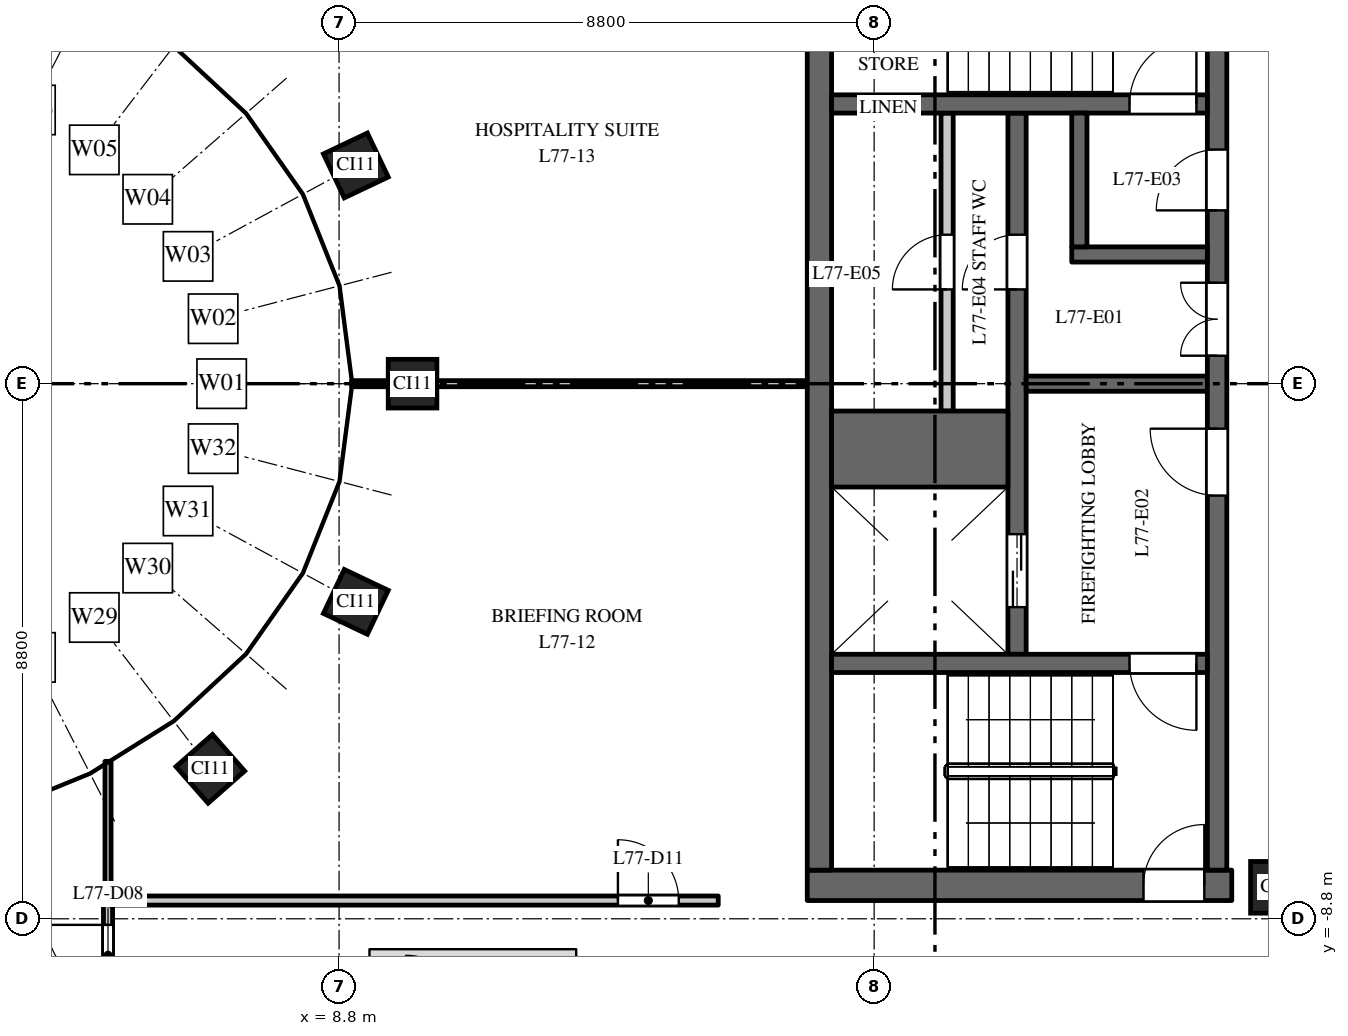
"""IFC4 building model, lengths in metres.
Left out: names, types, materials, properties, quantities, classifications, styles, units other than length and angle.
Written with IfcOpenShell. Run it as: python <this file> out.ifc"""

import sys

from ifc_helpers import new_model, si_unit, direction, frame, frame_2d, origin, origin_2d, place, context, subcontext, project, spatial, rectangle, extrude, element, fill, save


model = new_model("IFC4")
c1 = context("Model", 3, precision=1e-05, world=origin(), true_north=direction((0.0, 1.0)))
c2 = subcontext(c1, "Body", "Model", "MODEL_VIEW")
j1 = project(units=[si_unit("LENGTHUNIT", "METRE"), si_unit("PLANEANGLEUNIT", "RADIAN")], contexts=[c1])
p1 = place(None, origin())
s1 = spatial("IfcSite", under=j1, at=p1, CompositionType="ELEMENT")
p2 = place(p1, origin())
s2 = spatial("IfcBuilding", under=s1, at=p2, CompositionType="ELEMENT")
p3 = place(p2, frame((0.0, 0.0, 351.0)))
s3 = spatial("IfcBuildingStorey", under=s2, at=p3, CompositionType="ELEMENT", Elevation=351.0)
p4 = place(p3, frame((26.922, 0.0, 0.024), z_axis=(-0.671748348073, 0.0, 0.740779425242), x_axis=(0.0, -1.0, 0.0)))
e1 = element("IfcColumn", 1, at=p4, inside=s3, PredefinedType="COLUMN", context=c2, shape_type="SweptSolid", body=[
    extrude(rectangle(XDim=0.85, YDim=0.85, at=origin_2d()), origin(), (0.0, 0.0, 1.0), 7.392),
])
p5 = place(p3, frame((26.605, 2.884, 0.024), z_axis=(-0.663002424258, -0.107229988497, 0.740897776346), x_axis=(0.159659238674, -0.987172187365, 0.0)))
e2 = element("IfcColumn", 2, at=p5, inside=s3, PredefinedType="COLUMN", context=c2, shape_type="SweptSolid", body=[
    extrude(rectangle(XDim=0.85, YDim=0.85, at=origin_2d()), origin(), (0.0, 0.0, 1.0), 7.39),
])
p6 = place(p3, frame((25.682, 5.672, 0.058), z_axis=(-0.281200724754, -0.092390850742, 0.955191123858), x_axis=(0.312142088562, -0.950035429102, 0.0)))
e3 = element("IfcColumn", 3, at=p6, inside=s3, PredefinedType="COLUMN", context=c2, shape_type="SweptSolid", body=[
    extrude(rectangle(XDim=0.85, YDim=0.85, at=origin_2d()), origin(), (0.0, 0.0, 1.0), 5.697),
])
p7 = place(p3, frame((19.92, -12.714, 0.024), z_axis=(-0.48918887633, 0.459337710272, 0.7414196593), x_axis=(-0.684514461897, -0.728999280832, 0.0)))
e4 = element("IfcColumn", 4, at=p7, inside=s3, PredefinedType="COLUMN", context=c2, shape_type="SweptSolid", body=[
    extrude(rectangle(XDim=0.85, YDim=0.85, at=origin_2d()), origin(), (0.0, 0.0, 1.0), 7.385),
])
p8 = place(p3, frame((22.261, -10.641, 0.02), z_axis=(-0.376654859375, 0.265757737453, 0.887414188467), x_axis=(-0.57651482377, -0.817086689387, 0.0)))
e5 = element("IfcColumn", 5, at=p8, inside=s3, PredefinedType="COLUMN", context=c2, shape_type="SweptSolid", body=[
    extrude(rectangle(XDim=0.85, YDim=0.85, at=origin_2d()), origin(), (0.0, 0.0, 1.0), 6.175),
])
p9 = place(p3, frame((24.216, -8.282, 0.121), z_axis=(-0.025317754226, 0.012794994071, 0.999597568748), x_axis=(-0.451048184688, -0.89249959949, 0.0)))
e6 = element("IfcColumn", 6, at=p9, inside=s3, PredefinedType="COLUMN", context=c2, shape_type="SweptSolid", body=[
    extrude(rectangle(XDim=0.85, YDim=0.85, at=origin_2d()), origin(), (0.0, 0.0, 1.0), 5.381),
])
p10 = place(p3, frame((25.682, -5.672, 0.058), z_axis=(-0.281200724754, 0.092390850742, 0.955191123858), x_axis=(-0.312142088562, -0.950035429102, 0.0)))
e7 = element("IfcColumn", 7, at=p10, inside=s3, PredefinedType="COLUMN", context=c2, shape_type="SweptSolid", body=[
    extrude(rectangle(XDim=0.85, YDim=0.85, at=origin_2d()), origin(), (0.0, 0.0, 1.0), 5.697),
])
p11 = place(p3, frame((26.605, -2.884, 0.024), z_axis=(-0.663002424258, 0.107229988497, 0.740897776346), x_axis=(-0.159659238674, -0.987172187365, 0.0)))
e8 = element("IfcColumn", 8, at=p11, inside=s3, PredefinedType="COLUMN", context=c2, shape_type="SweptSolid", body=[
    extrude(rectangle(XDim=0.85, YDim=0.85, at=origin_2d()), origin(), (0.0, 0.0, 1.0), 7.39),
])
for number, where, z_axis, x_axis in (
    (9, (10.008, 0.0, 0.0), (0.0, 0.0, 1.0), (0.0, 1.0, 0.0)),
    (10, (9.076, 3.588, 0.0), (0.0, 0.0, 1.0), (-0.429, 0.903, 0.0)),
    (11, (6.682, -6.334, 0.0), (0.0, 0.0, 1.0), (0.751, 0.66, 0.0)),
    (12, (9.076, -3.588, 0.0), (0.0, 0.0, 1.0), (0.429, 0.903, 0.0)),
):
    element("IfcColumn", number, at=place(p3, frame(where, z_axis=z_axis, x_axis=x_axis)), inside=s3, PredefinedType="COLUMN", context=c2, shape_type="SweptSolid", body=[
        extrude(rectangle(XDim=0.8, YDim=0.8, at=origin_2d()), origin(), (0.0, 0.0, 1.0), 5.5),
    ])
p12 = place(p3, frame((16.5, -8.25, 0.0), z_axis=(0.0, 0.0, 1.0), x_axis=(1.0, 0.0, 0.0)))
e13 = element("IfcWall", 13, at=p12, inside=s3, PredefinedType="SHEAR", context=c2, shape_type="SweptSolid", body=[
    extrude(rectangle(XDim=6.981, YDim=0.5, at=frame_2d((3.491, 0.0))), origin(), (0.0, 0.0, 1.0), 5.3),
])
p13 = place(p12, frame((5.53, 0.0, 0.0)))
e14 = element("IfcOpeningElement", 14, at=p13, cuts=e13, PredefinedType="OPENING", context=c2, shape_type="SweptSolid", body=[
    extrude(rectangle(XDim=1.0, YDim=2.1, at=frame_2d((0.5, 1.05))), frame((0.0, 0.26, 0.0), z_axis=(0.0, -1.0, 0.0), x_axis=(1.0, 0.0, 0.0)), (0.0, 0.0, 1.0), 0.52),
])
p14 = place(p3, frame((18.8, -0.45, 0.0), z_axis=(0.0, 0.0, 1.0), x_axis=(0.0, 1.0, 0.0)))
e15 = element("IfcWall", 15, at=p14, inside=s3, PredefinedType="PARTITIONING", context=c2, shape_type="SweptSolid", body=[
    extrude(rectangle(XDim=4.9, YDim=0.2, at=frame_2d((2.45, 0.0))), origin(), (0.0, 0.0, 1.0), 4.5),
])
p15 = place(p14, frame((2.0, 0.0, 0.0)))
e16 = element("IfcOpeningElement", 16, at=p15, cuts=e15, PredefinedType="OPENING", context=c2, shape_type="SweptSolid", body=[
    extrude(rectangle(XDim=0.9, YDim=2.1, at=frame_2d((0.45, 1.05))), frame((0.0, 0.11, 0.0), z_axis=(0.0, -1.0, 0.0), x_axis=(1.0, 0.0, 0.0)), (0.0, 0.0, 1.0), 0.22),
])
p16 = place(p3, frame((19.95, -4.45, 0.0), z_axis=(0.0, 0.0, 1.0), x_axis=(0.0, 1.0, 0.0)))
e17 = element("IfcWall", 17, at=p16, inside=s3, PredefinedType="SHEAR", context=c2, shape_type="SweptSolid", body=[
    extrude(rectangle(XDim=8.9, YDim=0.3, at=frame_2d((4.45, 0.0))), origin(), (0.0, 0.0, 1.0), 5.3),
])
p17 = place(p16, frame((0.775, 0.0, 0.0)))
e18 = element("IfcOpeningElement", 18, at=p17, cuts=e17, PredefinedType="OPENING", context=c2, shape_type="SweptSolid", body=[
    extrude(rectangle(XDim=1.2, YDim=2.1, at=frame_2d((0.6, 1.05))), frame((0.0, 0.16, 0.0), z_axis=(0.0, -1.0, 0.0), x_axis=(1.0, 0.0, 0.0)), (0.0, 0.0, 1.0), 0.32),
])
p18 = place(p16, frame((6.0, 0.0, 0.0)))
e19 = element("IfcOpeningElement", 19, at=p18, cuts=e17, PredefinedType="OPENING", context=c2, shape_type="SweptSolid", body=[
    extrude(rectangle(XDim=0.9, YDim=2.1, at=frame_2d((0.45, 1.05))), frame((0.0, 0.16, 0.0), z_axis=(0.0, -1.0, 0.0), x_axis=(1.0, 0.0, 0.0)), (0.0, 0.0, 1.0), 0.32),
])
p19 = place(p3, frame((20.1, 0.0, 0.0), z_axis=(0.0, 0.0, 1.0), x_axis=(1.0, 0.0, 0.0)))
e20 = element("IfcWall", 20, at=p19, inside=s3, PredefinedType="SHEAR", context=c2, shape_type="SweptSolid", body=[
    extrude(rectangle(XDim=2.98, YDim=0.25, at=frame_2d((1.49, 0.0))), origin(), (0.0, 0.0, 1.0), 5.3),
])
p20 = place(p3, frame((16.7, -8.0, 0.0), z_axis=(0.0, 0.0, 1.0), x_axis=(0.0, 1.0, 0.0)))
e21 = element("IfcWall", 21, at=p20, inside=s3, PredefinedType="SHEAR", context=c2, shape_type="SweptSolid", body=[
    extrude(rectangle(XDim=16.0, YDim=0.4, at=frame_2d((8.0, 0.0))), origin(), (0.0, 0.0, 1.0), 5.3),
])
p21 = place(p3, frame((23.24, -8.0, 0.0), z_axis=(0.0, 0.0, 1.0), x_axis=(0.0, 1.0, 0.0)))
e22 = element("IfcWall", 22, at=p21, inside=s3, PredefinedType="SHEAR", context=c2, shape_type="SweptSolid", body=[
    extrude(rectangle(XDim=16.0, YDim=0.32, at=frame_2d((8.0, 0.0))), origin(), (0.0, 0.0, 1.0), 5.3),
])
p22 = place(p21, frame((6.16, 0.0, 0.0)))
e23 = element("IfcOpeningElement", 23, at=p22, cuts=e22, PredefinedType="OPENING", context=c2, shape_type="SweptSolid", body=[
    extrude(rectangle(XDim=1.1, YDim=2.1, at=frame_2d((0.55, 1.05))), frame((0.0, 0.17, 0.0), z_axis=(0.0, -1.0, 0.0), x_axis=(1.0, 0.0, 0.0)), (0.0, 0.0, 1.0), 0.34),
])
p23 = place(p21, frame((10.85, 0.0, 0.0)))
e24 = element("IfcOpeningElement", 24, at=p23, cuts=e22, PredefinedType="OPENING", context=c2, shape_type="SweptSolid", body=[
    extrude(rectangle(XDim=1.0, YDim=2.1, at=frame_2d((0.5, 1.05))), frame((0.0, 0.17, 0.0), z_axis=(0.0, -1.0, 0.0), x_axis=(1.0, 0.0, 0.0)), (0.0, 0.0, 1.0), 0.34),
])
p24 = place(p21, frame((8.46, 0.0, 0.0)))
e25 = element("IfcOpeningElement", 25, at=p24, cuts=e22, PredefinedType="OPENING", context=c2, shape_type="SweptSolid", body=[
    extrude(rectangle(XDim=1.2, YDim=2.1, at=frame_2d((0.6, 1.05))), frame((0.0, 0.17, 0.0), z_axis=(0.0, -1.0, 0.0), x_axis=(1.0, 0.0, 0.0)), (0.0, 0.0, 1.0), 0.34),
])
p25 = place(p3, frame((16.9, -1.075, 0.0), z_axis=(0.0, 0.0, 1.0), x_axis=(1.0, 0.0, 0.0)))
e26 = element("IfcWall", 26, at=p25, inside=s3, PredefinedType="SHEAR", context=c2, shape_type="SweptSolid", body=[
    extrude(rectangle(XDim=2.9, YDim=1.25, at=frame_2d((1.45, 0.0))), origin(), (0.0, 0.0, 1.0), 5.3),
])
p26 = place(p3, frame((16.9, 4.6, 0.0), z_axis=(0.0, 0.0, 1.0), x_axis=(1.0, 0.0, 0.0)))
e27 = element("IfcWall", 27, at=p26, inside=s3, PredefinedType="SHEAR", context=c2, shape_type="SweptSolid", body=[
    extrude(rectangle(XDim=6.18, YDim=0.3, at=frame_2d((3.09, 0.0))), origin(), (0.0, 0.0, 1.0), 5.3),
])
p27 = place(p26, frame((4.9, 0.0, 0.0)))
e28 = element("IfcOpeningElement", 28, at=p27, cuts=e27, PredefinedType="OPENING", context=c2, shape_type="SweptSolid", body=[
    extrude(rectangle(XDim=1.1, YDim=2.1, at=frame_2d((0.55, 1.05))), frame((0.0, 0.16, 0.0), z_axis=(0.0, -1.0, 0.0), x_axis=(1.0, 0.0, 0.0)), (0.0, 0.0, 1.0), 0.32),
])
p28 = place(p3, frame((16.9, -4.6, 0.0), z_axis=(0.0, 0.0, 1.0), x_axis=(1.0, 0.0, 0.0)))
e29 = element("IfcWall", 29, at=p28, inside=s3, PredefinedType="SHEAR", context=c2, shape_type="SweptSolid", body=[
    extrude(rectangle(XDim=6.18, YDim=0.3, at=frame_2d((3.09, 0.0))), origin(), (0.0, 0.0, 1.0), 5.3),
])
p29 = place(p28, frame((4.9, 0.0, 0.0)))
e30 = element("IfcOpeningElement", 30, at=p29, cuts=e29, PredefinedType="OPENING", context=c2, shape_type="SweptSolid", body=[
    extrude(rectangle(XDim=1.1, YDim=2.1, at=frame_2d((0.55, 1.05))), frame((0.0, 0.16, 0.0), z_axis=(0.0, -1.0, 0.0), x_axis=(1.0, 0.0, 0.0)), (0.0, 0.0, 1.0), 0.32),
])
p30 = place(p3, frame((20.85, 2.125, 0.0), z_axis=(0.0, 0.0, 1.0), x_axis=(1.0, 0.0, 0.0)))
e31 = element("IfcWall", 31, at=p30, inside=s3, PredefinedType="SHEAR", context=c2, shape_type="SweptSolid", body=[
    extrude(rectangle(XDim=2.23, YDim=0.25, at=frame_2d((1.115, 0.0))), origin(), (0.0, 0.0, 1.0), 5.3),
])
p31 = place(p3, frame((20.975, 2.25, 0.0), z_axis=(0.0, 0.0, 1.0), x_axis=(0.0, 1.0, 0.0)))
e32 = element("IfcWall", 32, at=p31, inside=s3, PredefinedType="SHEAR", context=c2, shape_type="SweptSolid", body=[
    extrude(rectangle(XDim=2.2, YDim=0.25, at=frame_2d((1.1, 0.0))), origin(), (0.0, 0.0, 1.0), 5.3),
])
p32 = place(p3, frame((5.0, -10.4, 0.0), z_axis=(0.0, 0.0, 1.0), x_axis=(0.0, 1.0, 0.0)))
e33 = element("IfcWall", 33, at=p32, inside=s3, PredefinedType="PARTITIONING", context=c2, shape_type="SweptSolid", body=[
    extrude(rectangle(XDim=1.9, YDim=0.15, at=frame_2d((0.95, 0.0))), origin(), (0.0, 0.0, 1.0), 5.2),
])
p33 = place(p32, frame((0.5, 0.0, 0.0)))
e34 = element("IfcOpeningElement", 34, at=p33, cuts=e33, PredefinedType="OPENING", context=c2, shape_type="SweptSolid", body=[
    extrude(rectangle(XDim=1.0, YDim=2.1, at=frame_2d((0.5, 1.05))), frame((0.0, 0.085, 0.0), z_axis=(0.0, -1.0, 0.0), x_axis=(1.0, 0.0, 0.0)), (0.0, 0.0, 1.0), 0.17),
])
p34 = place(p3, frame((5.0, -8.5, 0.0), z_axis=(0.0, 0.0, 1.0), x_axis=(0.0, 1.0, 0.0)))
e35 = element("IfcWall", 35, at=p34, inside=s3, PredefinedType="PARTITIONING", context=c2, shape_type="SweptSolid", body=[
    extrude(rectangle(XDim=2.289, YDim=0.1, at=frame_2d((1.145, 0.0))), origin(), (0.0, 0.0, 1.0), 4.5),
])
p35 = place(p3, frame((5.0, -8.5, 0.0), z_axis=(0.0, 0.0, 1.0), x_axis=(1.0, 0.0, 0.0)))
e36 = element("IfcWall", 36, at=p35, inside=s3, PredefinedType="PARTITIONING", context=c2, shape_type="SweptSolid", body=[
    extrude(rectangle(XDim=10.036, YDim=0.15, at=frame_2d((5.018, 0.0))), origin(), (0.0, 0.0, 1.0), 4.6),
])
p36 = place(p35, frame((8.386, 0.0, 0.0)))
e37 = element("IfcOpeningElement", 37, at=p36, cuts=e36, PredefinedType="OPENING", context=c2, shape_type="SweptSolid", body=[
    extrude(rectangle(XDim=1.0, YDim=2.1, at=frame_2d((0.5, 1.05))), frame((0.0, 0.085, 0.0), z_axis=(0.0, -1.0, 0.0), x_axis=(1.0, 0.0, 0.0)), (0.0, 0.0, 1.0), 0.17),
])
p37 = place(p3, frame((9.005, 0.0, 0.0), z_axis=(0.0, 0.0, 1.0), x_axis=(1.0, 0.0, 0.0)))
e38 = element("IfcWall", 38, at=p37, inside=s3, PredefinedType="PARTITIONING", context=c2, shape_type="SweptSolid", body=[
    extrude(rectangle(XDim=7.495, YDim=0.1, at=frame_2d((3.748, 0.0))), origin(), (0.0, 0.0, 1.0), 4.2),
])
p38 = place(p17, origin())
e39 = element("IfcDoor", 39, at=p38, inside=s3, OperationType="DOUBLE_DOOR_SLIDING", PredefinedType="DOOR", context=c2, shape_type="SweptSolid", body=[
    extrude(rectangle(XDim=1.2, YDim=2.1, at=frame_2d((0.6, 1.05))), frame((0.0, 0.025, 0.0), z_axis=(0.0, -1.0, 0.0), x_axis=(1.0, 0.0, 0.0)), (0.0, 0.0, 1.0), 0.05),
])
fill(e18, e39)
p39 = place(p27, origin())
e40 = element("IfcDoor", 40, at=p39, inside=s3, OperationType="SINGLE_SWING_LEFT", PredefinedType="DOOR", context=c2, shape_type="SweptSolid", body=[
    extrude(rectangle(XDim=1.1, YDim=2.1, at=frame_2d((0.55, 1.05))), frame((0.0, 0.025, 0.0), z_axis=(0.0, -1.0, 0.0), x_axis=(1.0, 0.0, 0.0)), (0.0, 0.0, 1.0), 0.05),
])
fill(e28, e40)
p40 = place(p29, origin())
e41 = element("IfcDoor", 41, at=p40, inside=s3, OperationType="SINGLE_SWING_RIGHT", PredefinedType="DOOR", context=c2, shape_type="SweptSolid", body=[
    extrude(rectangle(XDim=1.1, YDim=2.1, at=frame_2d((0.55, 1.05))), frame((0.0, 0.025, 0.0), z_axis=(0.0, -1.0, 0.0), x_axis=(1.0, 0.0, 0.0)), (0.0, 0.0, 1.0), 0.05),
])
fill(e30, e41)
p41 = place(p22, origin())
e42 = element("IfcDoor", 42, at=p41, inside=s3, OperationType="SINGLE_SWING_LEFT", PredefinedType="DOOR", context=c2, shape_type="SweptSolid", body=[
    extrude(rectangle(XDim=1.1, YDim=2.1, at=frame_2d((0.55, 1.05))), frame((0.0, 0.025, 0.0), z_axis=(0.0, -1.0, 0.0), x_axis=(1.0, 0.0, 0.0)), (0.0, 0.0, 1.0), 0.05),
])
fill(e23, e42)
p42 = place(p23, origin())
e43 = element("IfcDoor", 43, at=p42, inside=s3, OperationType="SINGLE_SWING_RIGHT", PredefinedType="DOOR", context=c2, shape_type="SweptSolid", body=[
    extrude(rectangle(XDim=1.0, YDim=2.1, at=frame_2d((0.5, 1.05))), frame((0.0, 0.025, 0.0), z_axis=(0.0, -1.0, 0.0), x_axis=(1.0, 0.0, 0.0)), (0.0, 0.0, 1.0), 0.05),
])
fill(e24, e43)
p43 = place(p24, origin())
e44 = element("IfcDoor", 44, at=p43, inside=s3, OperationType="DOUBLE_DOOR_DOUBLE_SWING", PredefinedType="DOOR", context=c2, shape_type="SweptSolid", body=[
    extrude(rectangle(XDim=1.2, YDim=2.1, at=frame_2d((0.6, 1.05))), frame((0.0, 0.025, 0.0), z_axis=(0.0, -1.0, 0.0), x_axis=(1.0, 0.0, 0.0)), (0.0, 0.0, 1.0), 0.05),
])
fill(e25, e44)
p44 = place(p13, origin())
e45 = element("IfcDoor", 45, at=p44, inside=s3, OperationType="SINGLE_SWING_LEFT", PredefinedType="DOOR", context=c2, shape_type="SweptSolid", body=[
    extrude(rectangle(XDim=1.0, YDim=2.1, at=frame_2d((0.5, 1.05))), frame((0.0, 0.025, 0.0), z_axis=(0.0, -1.0, 0.0), x_axis=(1.0, 0.0, 0.0)), (0.0, 0.0, 1.0), 0.05),
])
fill(e14, e45)
p45 = place(p18, origin())
e46 = element("IfcDoor", 46, at=p45, inside=s3, OperationType="SINGLE_SWING_RIGHT", PredefinedType="DOOR", context=c2, shape_type="SweptSolid", body=[
    extrude(rectangle(XDim=0.9, YDim=2.1, at=frame_2d((0.45, 1.05))), frame((0.0, 0.025, 0.0), z_axis=(0.0, -1.0, 0.0), x_axis=(1.0, 0.0, 0.0)), (0.0, 0.0, 1.0), 0.05),
])
fill(e19, e46)
p46 = place(p15, origin())
e47 = element("IfcDoor", 47, at=p46, inside=s3, OperationType="SINGLE_SWING_RIGHT", PredefinedType="DOOR", context=c2, shape_type="SweptSolid", body=[
    extrude(rectangle(XDim=0.9, YDim=2.1, at=frame_2d((0.45, 1.05))), frame((0.0, 0.025, 0.0), z_axis=(0.0, -1.0, 0.0), x_axis=(1.0, 0.0, 0.0)), (0.0, 0.0, 1.0), 0.05),
])
fill(e16, e47)
p47 = place(p33, origin())
e48 = element("IfcDoor", 48, at=p47, inside=s3, OperationType="SINGLE_SWING_RIGHT", PredefinedType="DOOR", context=c2, shape_type="SweptSolid", body=[
    extrude(rectangle(XDim=1.0, YDim=2.1, at=frame_2d((0.5, 1.05))), frame((0.0, 0.025, 0.0), z_axis=(0.0, -1.0, 0.0), x_axis=(1.0, 0.0, 0.0)), (0.0, 0.0, 1.0), 0.05),
])
fill(e34, e48)
p48 = place(p36, origin())
e49 = element("IfcDoor", 49, at=p48, inside=s3, OperationType="SINGLE_SWING_LEFT", PredefinedType="DOOR", context=c2, shape_type="SweptSolid", body=[
    extrude(rectangle(XDim=1.0, YDim=2.1, at=frame_2d((0.5, 1.05))), frame((0.0, 0.025, 0.0), z_axis=(0.0, -1.0, 0.0), x_axis=(1.0, 0.0, 0.0)), (0.0, 0.0, 1.0), 0.05),
])
fill(e37, e49)
save(model, sys.argv[1])
